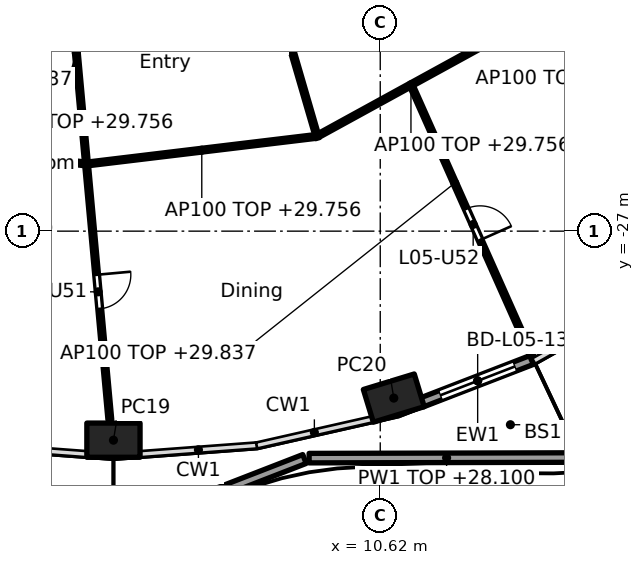
"""IFC4 building model, lengths in metres.
Left out: names, types, materials, properties, quantities, classifications, styles, units other than length and angle.
Written with IfcOpenShell. Run it as: python <this file> out.ifc"""

import sys

from ifc_helpers import new_model, si_unit, direction, frame, frame_2d, origin, origin_2d, place, context, subcontext, project, spatial, rectangle, hollow_rectangle, extrude, element, fill, save


model = new_model("IFC4")
c1 = context("Model", 3, precision=1e-05, world=origin(), true_north=direction((0.0, 1.0)))
c2 = subcontext(c1, "Body", "Model", "MODEL_VIEW")
j1 = project(units=[si_unit("LENGTHUNIT", "METRE"), si_unit("PLANEANGLEUNIT", "RADIAN")], contexts=[c1])
p1 = place(None, origin())
s1 = spatial("IfcSite", under=j1, at=p1, CompositionType="ELEMENT")
p2 = place(p1, origin())
s2 = spatial("IfcBuilding", under=s1, at=p2, CompositionType="ELEMENT")
p3 = place(p2, frame((0.0, 0.0, 27.0)))
s3 = spatial("IfcBuildingStorey", under=s2, at=p3, CompositionType="ELEMENT", Elevation=27.0)
for number, where, z_axis, x_axis in (
    (1, (3.6, -32.5, 0.0), (0.0, 0.0, 1.0), (1.0, 0.0, 0.0)),
    (2, (10.976, -31.393, 0.0), (0.0, 0.0, 1.0), (0.957, 0.292, 0.0)),
):
    element("IfcColumn", number, at=place(p3, frame(where, z_axis=z_axis, x_axis=x_axis)), inside=s3, PredefinedType="COLUMN", context=c2, shape_type="SweptSolid", body=[
        extrude(hollow_rectangle(XDim=1.4, YDim=0.9, WallThickness=0.05, at=origin_2d()), origin(), (0.0, 0.0, 1.0), 3.7),
    ])
p4 = place(p3, frame((14.653, -30.371, 0.0), z_axis=(0.0, 0.0, 1.0), x_axis=(-0.932809381943, -0.360370166577, 0.0)))
e3 = element("IfcWall", 3, at=p4, inside=s3, PredefinedType="SOLIDWALL", context=c2, shape_type="SweptSolid", body=[
    extrude(rectangle(XDim=3.151, YDim=0.25, at=frame_2d((1.575, 0.0))), origin(), (0.0, 0.0, 1.0), 3.44),
])
p5 = place(p4, frame((0.525, 0.0, 0.0)))
e4 = element("IfcOpeningElement", 4, at=p5, cuts=e3, PredefinedType="OPENING", context=c2, shape_type="SweptSolid", body=[
    extrude(rectangle(XDim=2.1, YDim=2.4, at=frame_2d((1.05, 1.2))), frame((0.0, 0.135, 0.0), z_axis=(0.0, -1.0, 0.0), x_axis=(1.0, 0.0, 0.0)), (0.0, 0.0, 1.0), 0.27),
])
p6 = place(p3, frame((3.487, -34.99, 0.0), z_axis=(0.0, 0.0, 1.0), x_axis=(0.932281162563, 0.361734479874, 0.0)))
e5 = element("IfcWall", 5, at=p6, inside=s3, PredefinedType="PARAPET", context=c2, shape_type="SweptSolid", body=[
    extrude(rectangle(XDim=5.513, YDim=0.25, at=frame_2d((2.756, 0.0))), origin(), (0.0, 0.0, 1.0), 1.1),
])
p7 = place(p3, frame((8.749, -32.972, 0.0), z_axis=(0.0, 0.0, 1.0), x_axis=(0.999997519695, 0.002227241126, 0.0)))
e6 = element("IfcWall", 6, at=p7, inside=s3, PredefinedType="PARAPET", context=c2, shape_type="SweptSolid", body=[
    extrude(rectangle(XDim=7.235, YDim=0.25, at=frame_2d((3.617, 0.0))), origin(), (0.0, 0.0, 1.0), 1.1),
])
p8 = place(p3, frame((-3.031, -24.543, 0.0), z_axis=(0.0, 0.0, 1.0), x_axis=(0.993255612046, -0.115945198862, 0.0)))
e7 = element("IfcWall", 7, at=p8, inside=s3, PredefinedType="PARTITIONING", context=c2, shape_type="SweptSolid", body=[
    extrude(rectangle(XDim=5.913, YDim=0.1, at=frame_2d((2.956, 0.0))), origin(), (0.0, 0.0, 1.0), 2.756),
])
p9 = place(p8, frame((1.028, 0.0, 0.0)))
e8 = element("IfcOpeningElement", 8, at=p9, cuts=e7, PredefinedType="OPENING", context=c2, shape_type="SweptSolid", body=[
    extrude(rectangle(XDim=0.9, YDim=2.1, at=frame_2d((0.45, 1.05))), frame((0.0, 0.06, 0.0), z_axis=(0.0, -1.0, 0.0), x_axis=(1.0, 0.0, 0.0)), (0.0, 0.0, 1.0), 0.12),
])
p10 = place(p3, frame((1.744, -12.664, 0.0), z_axis=(0.0, 0.0, 1.0), x_axis=(0.090893639596, -0.995860605849, 0.0)))
e9 = element("IfcWall", 9, at=p10, inside=s3, PredefinedType="PARTITIONING", context=c2, shape_type="SweptSolid", body=[
    extrude(rectangle(XDim=19.374, YDim=0.1, at=frame_2d((9.687, 0.0))), origin(), (0.0, 0.0, 1.0), 2.687),
])
p11 = place(p10, frame((2.27, 0.0, 0.0)))
e10 = element("IfcOpeningElement", 10, at=p11, cuts=e9, PredefinedType="OPENING", context=c2, shape_type="SweptSolid", body=[
    extrude(rectangle(XDim=0.9, YDim=2.1, at=frame_2d((0.45, 1.05))), frame((0.0, 0.06, 0.0), z_axis=(0.0, -1.0, 0.0), x_axis=(1.0, 0.0, 0.0)), (0.0, 0.0, 1.0), 0.12),
])
p12 = place(p10, frame((8.582, 0.0, 0.0)))
e11 = element("IfcOpeningElement", 11, at=p12, cuts=e9, PredefinedType="OPENING", context=c2, shape_type="SweptSolid", body=[
    extrude(rectangle(XDim=0.9, YDim=2.1, at=frame_2d((0.45, 1.05))), frame((0.0, 0.06, 0.0), z_axis=(0.0, -1.0, 0.0), x_axis=(1.0, 0.0, 0.0)), (0.0, 0.0, 1.0), 0.12),
])
p13 = place(p10, frame((15.548, 0.0, 0.0)))
e12 = element("IfcOpeningElement", 12, at=p13, cuts=e9, PredefinedType="OPENING", context=c2, shape_type="SweptSolid", body=[
    extrude(rectangle(XDim=0.9, YDim=2.1, at=frame_2d((0.45, 1.05))), frame((0.0, 0.06, 0.0), z_axis=(0.0, -1.0, 0.0), x_axis=(1.0, 0.0, 0.0)), (0.0, 0.0, 1.0), 0.12),
])
p14 = place(p3, frame((2.941, -25.229, 0.0), z_axis=(0.0, 0.0, 1.0), x_axis=(0.992836798252, 0.119478416615, 0.0)))
e13 = element("IfcWall", 13, at=p14, inside=s3, PredefinedType="PARTITIONING", context=c2, shape_type="SweptSolid", body=[
    extrude(rectangle(XDim=6.01, YDim=0.1, at=frame_2d((3.005, 0.0))), origin(), (0.0, 0.0, 1.0), 2.756),
])
p15 = place(p3, frame((6.137, -14.83, 0.0), z_axis=(0.0, 0.0, 1.0), x_axis=(0.279843546189, -0.960045618529, 0.0)))
e14 = element("IfcWall", 14, at=p15, inside=s3, PredefinedType="PARTITIONING", context=c2, shape_type="SweptSolid", body=[
    extrude(rectangle(XDim=10.127, YDim=0.1, at=frame_2d((5.063, 0.0))), origin(), (0.0, 0.0, 1.0), 3.44),
])
p16 = place(p15, frame((1.334, 0.0, 0.0)))
e15 = element("IfcOpeningElement", 15, at=p16, cuts=e14, PredefinedType="OPENING", context=c2, shape_type="SweptSolid", body=[
    extrude(rectangle(XDim=0.9, YDim=2.1, at=frame_2d((0.45, 1.05))), frame((0.0, 0.06, 0.0), z_axis=(0.0, -1.0, 0.0), x_axis=(1.0, 0.0, 0.0)), (0.0, 0.0, 1.0), 0.12),
])
p17 = place(p15, frame((6.091, 0.0, 0.0)))
e16 = element("IfcOpeningElement", 16, at=p17, cuts=e14, PredefinedType="OPENING", context=c2, shape_type="SweptSolid", body=[
    extrude(rectangle(XDim=0.9, YDim=2.1, at=frame_2d((0.45, 1.05))), frame((0.0, 0.06, 0.0), z_axis=(0.0, -1.0, 0.0), x_axis=(1.0, 0.0, 0.0)), (0.0, 0.0, 1.0), 0.12),
])
p18 = place(p3, frame((9.001, -24.48, 0.0), z_axis=(0.0, 0.0, 1.0), x_axis=(0.876794415294, 0.480865421203, 0.0)))
e17 = element("IfcWall", 17, at=p18, inside=s3, PredefinedType="PARTITIONING", context=c2, shape_type="SweptSolid", body=[
    extrude(rectangle(XDim=5.536, YDim=0.1, at=frame_2d((2.768, 0.0))), origin(), (0.0, 0.0, 1.0), 2.756),
])
p19 = place(p3, frame((11.448, -23.195, 0.0), z_axis=(0.0, 0.0, 1.0), x_axis=(0.407016520798, -0.913420796675, 0.0)))
e18 = element("IfcWall", 18, at=p19, inside=s3, PredefinedType="PARTITIONING", context=c2, shape_type="SweptSolid", body=[
    extrude(rectangle(XDim=7.944, YDim=0.1, at=frame_2d((3.972, 0.0))), origin(), (0.0, 0.0, 1.0), 2.837),
])
p20 = place(p19, frame((3.522, 0.0, 0.0)))
e19 = element("IfcOpeningElement", 19, at=p20, cuts=e18, PredefinedType="OPENING", context=c2, shape_type="SweptSolid", body=[
    extrude(rectangle(XDim=0.9, YDim=2.1, at=frame_2d((0.45, 1.05))), frame((0.0, 0.06, 0.0), z_axis=(0.0, -1.0, 0.0), x_axis=(1.0, 0.0, 0.0)), (0.0, 0.0, 1.0), 0.12),
])
p21 = place(p5, origin())
e20 = element("IfcDoor", 20, at=p21, inside=s3, OperationType="SLIDING_TO_LEFT", PredefinedType="DOOR", context=c2, shape_type="SweptSolid", body=[
    extrude(rectangle(XDim=2.1, YDim=2.4, at=frame_2d((1.05, 1.2))), frame((0.0, 0.025, 0.0), z_axis=(0.0, -1.0, 0.0), x_axis=(1.0, 0.0, 0.0)), (0.0, 0.0, 1.0), 0.05),
])
fill(e4, e20)
p22 = place(p13, origin())
e21 = element("IfcDoor", 21, at=p22, inside=s3, OperationType="SINGLE_SWING_LEFT", PredefinedType="DOOR", context=c2, shape_type="SweptSolid", body=[
    extrude(rectangle(XDim=0.9, YDim=2.1, at=frame_2d((0.45, 1.05))), frame((0.0, 0.025, 0.0), z_axis=(0.0, -1.0, 0.0), x_axis=(1.0, 0.0, 0.0)), (0.0, 0.0, 1.0), 0.05),
])
fill(e12, e21)
p23 = place(p20, origin())
e22 = element("IfcDoor", 22, at=p23, inside=s3, OperationType="SINGLE_SWING_RIGHT", PredefinedType="DOOR", context=c2, shape_type="SweptSolid", body=[
    extrude(rectangle(XDim=0.9, YDim=2.1, at=frame_2d((0.45, 1.05))), frame((0.0, 0.025, 0.0), z_axis=(0.0, -1.0, 0.0), x_axis=(1.0, 0.0, 0.0)), (0.0, 0.0, 1.0), 0.05),
])
fill(e19, e22)
save(model, sys.argv[1])
